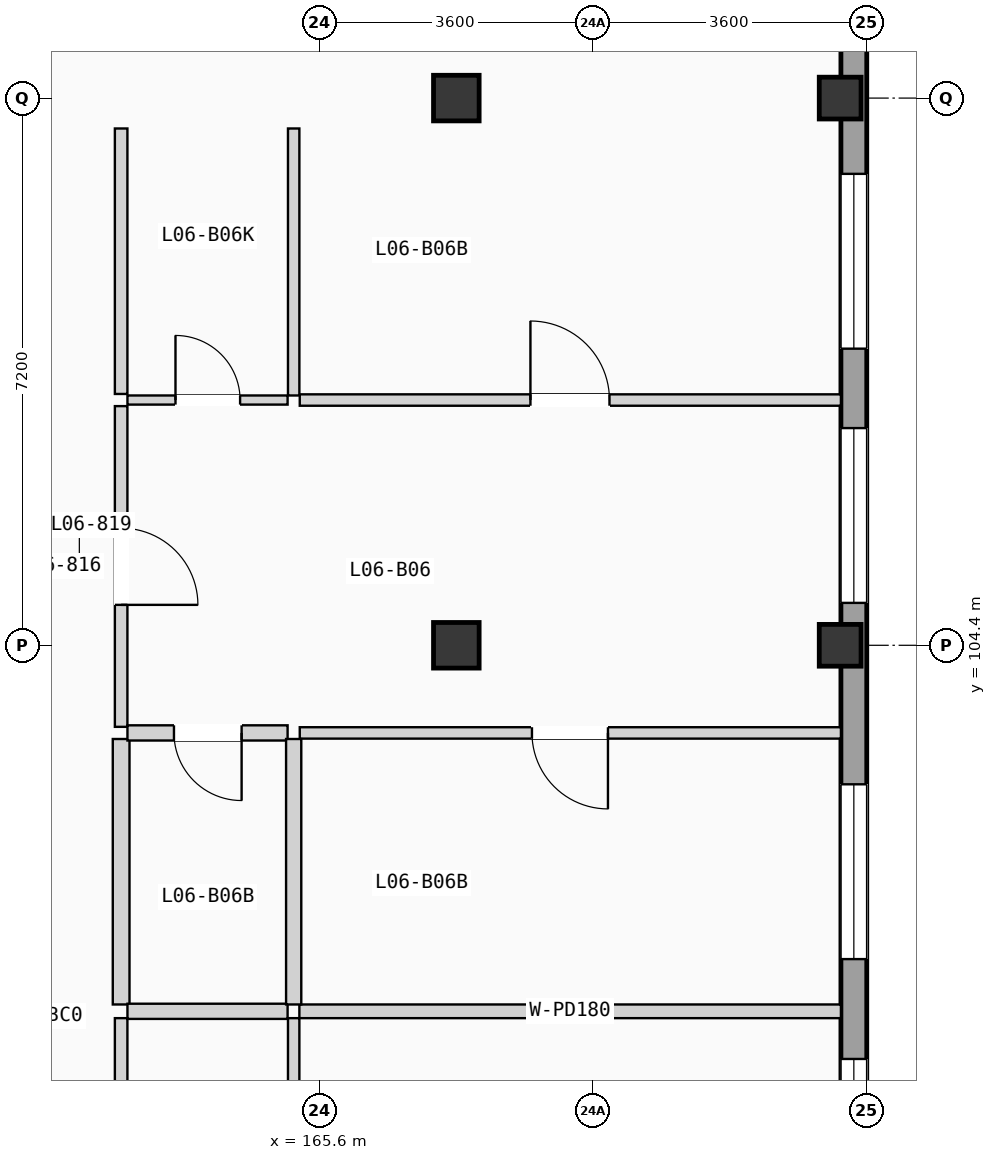
"""IFC4 building model, lengths in metres.
Left out: names, types, materials, properties, quantities, classifications, styles, units other than length and angle.
Written with IfcOpenShell. Run it as: python <this file> out.ifc"""

import sys

from ifc_helpers import new_model, si_unit, direction, frame, frame_2d, origin, origin_2d, place, context, subcontext, project, spatial, rectangle, extrude, element, fill, save


model = new_model("IFC4")
c1 = context("Model", 3, precision=1e-05, world=origin(), true_north=direction((0.0, 1.0)))
c2 = subcontext(c1, "Body", "Model", "MODEL_VIEW")
j1 = project(units=[si_unit("LENGTHUNIT", "METRE"), si_unit("PLANEANGLEUNIT", "RADIAN")], contexts=[c1])
p1 = place(None, origin())
s1 = spatial("IfcSite", under=j1, at=p1, CompositionType="ELEMENT")
p2 = place(p1, origin())
s2 = spatial("IfcBuilding", under=s1, at=p2, CompositionType="ELEMENT")
p3 = place(p2, frame((0.0, 0.0, 21.525)))
s3 = spatial("IfcBuildingStorey", under=s2, at=p3, CompositionType="ELEMENT", Elevation=21.525)
for number, where, z_axis, x_axis in (
    (1, (167.4, 104.4, 0.0), (0.0, 0.0, 1.0), (1.0, 0.0, 0.0)),
    (2, (167.4, 111.6, 0.0), (0.0, 0.0, 1.0), (1.0, 0.0, 0.0)),
):
    element("IfcColumn", number, at=place(p3, frame(where, z_axis=z_axis, x_axis=x_axis)), inside=s3, PredefinedType="COLUMN", context=c2, shape_type="SweptSolid", body=[
        extrude(rectangle(XDim=0.6, YDim=0.6, at=origin_2d()), origin(), (0.0, 0.0, 1.0), 3.15),
    ])
for number, where, z_axis, x_axis in (
    (3, (172.45, 104.4, 0.0), (0.0, 0.0, 1.0), (1.0, 0.0, 0.0)),
    (4, (172.45, 111.6, 0.0), (0.0, 0.0, 1.0), (1.0, 0.0, 0.0)),
):
    element("IfcColumn", number, at=place(p3, frame(where, z_axis=z_axis, x_axis=x_axis)), inside=s3, PredefinedType="COLUMN", context=c2, shape_type="SweptSolid", body=[
        extrude(rectangle(XDim=0.55, YDim=0.55, at=origin_2d()), origin(), (0.0, 0.0, 1.0), 3.15),
    ])
p4 = place(p3, frame((172.63, 68.74, 0.0), z_axis=(0.0, 0.0, 1.0), x_axis=(0.0, 1.0, 0.0)))
e5 = element("IfcWall", 5, at=p4, inside=s3, PredefinedType="SOLIDWALL", context=c2, shape_type="SweptSolid", body=[
    extrude(rectangle(XDim=49.72, YDim=0.34, at=frame_2d((24.86, 0.0))), origin(), (0.0, 0.0, 1.0), 2.89),
])
p5 = place(p4, frame((11.276, 0.0, 0.9)))
e6 = element("IfcOpeningElement", 6, at=p5, cuts=e5, PredefinedType="OPENING", context=c2, shape_type="SweptSolid", body=[
    extrude(rectangle(XDim=2.15, YDim=1.2, at=frame_2d((1.075, 0.6))), frame((0.0, 0.18, 0.0), z_axis=(0.0, -1.0, 0.0), x_axis=(1.0, 0.0, 0.0)), (0.0, 0.0, 1.0), 0.36),
])
p6 = place(p4, frame((7.931, 0.0, 0.855)))
e7 = element("IfcOpeningElement", 7, at=p6, cuts=e5, PredefinedType="OPENING", context=c2, shape_type="SweptSolid", body=[
    extrude(rectangle(XDim=2.15, YDim=1.35, at=frame_2d((1.075, 0.675))), frame((0.0, 0.18, 0.0), z_axis=(0.0, -1.0, 0.0), x_axis=(1.0, 0.0, 0.0)), (0.0, 0.0, 1.0), 0.36),
])
p7 = place(p4, frame((15.965, 0.0, 0.705)))
e8 = element("IfcOpeningElement", 8, at=p7, cuts=e5, PredefinedType="OPENING", context=c2, shape_type="SweptSolid", body=[
    extrude(rectangle(XDim=2.15, YDim=1.5, at=frame_2d((1.075, 0.75))), frame((0.0, 0.18, 0.0), z_axis=(0.0, -1.0, 0.0), x_axis=(1.0, 0.0, 0.0)), (0.0, 0.0, 1.0), 0.36),
])
p8 = place(p4, frame((23.785, 0.0, 0.555)))
e9 = element("IfcOpeningElement", 9, at=p8, cuts=e5, PredefinedType="OPENING", context=c2, shape_type="SweptSolid", body=[
    extrude(rectangle(XDim=2.15, YDim=1.65, at=frame_2d((1.075, 0.825))), frame((0.0, 0.18, 0.0), z_axis=(0.0, -1.0, 0.0), x_axis=(1.0, 0.0, 0.0)), (0.0, 0.0, 1.0), 0.36),
])
p9 = place(p4, frame((19.503, 0.0, 0.85)))
e10 = element("IfcOpeningElement", 10, at=p9, cuts=e5, PredefinedType="OPENING", context=c2, shape_type="SweptSolid", body=[
    extrude(rectangle(XDim=0.95, YDim=1.2, at=frame_2d((0.475, 0.6))), frame((0.0, 0.18, 0.0), z_axis=(0.0, -1.0, 0.0), x_axis=(1.0, 0.0, 0.0)), (0.0, 0.0, 1.0), 0.36),
])
p10 = place(p4, frame((29.267, 0.0, 0.85)))
e11 = element("IfcOpeningElement", 11, at=p10, cuts=e5, PredefinedType="OPENING", context=c2, shape_type="SweptSolid", body=[
    extrude(rectangle(XDim=0.95, YDim=1.2, at=frame_2d((0.475, 0.6))), frame((0.0, 0.18, 0.0), z_axis=(0.0, -1.0, 0.0), x_axis=(1.0, 0.0, 0.0)), (0.0, 0.0, 1.0), 0.36),
])
p11 = place(p4, frame((36.218, 0.0, 0.855)))
e12 = element("IfcOpeningElement", 12, at=p11, cuts=e5, PredefinedType="OPENING", context=c2, shape_type="SweptSolid", body=[
    extrude(rectangle(XDim=2.3, YDim=1.35, at=frame_2d((1.15, 0.675))), frame((0.0, 0.18, 0.0), z_axis=(0.0, -1.0, 0.0), x_axis=(1.0, 0.0, 0.0)), (0.0, 0.0, 1.0), 0.36),
])
p12 = place(p4, frame((31.531, 0.0, 0.705)))
e13 = element("IfcOpeningElement", 13, at=p12, cuts=e5, PredefinedType="OPENING", context=c2, shape_type="SweptSolid", body=[
    extrude(rectangle(XDim=2.3, YDim=1.5, at=frame_2d((1.15, 0.75))), frame((0.0, 0.18, 0.0), z_axis=(0.0, -1.0, 0.0), x_axis=(1.0, 0.0, 0.0)), (0.0, 0.0, 1.0), 0.36),
])
p13 = place(p4, frame((39.563, 0.0, 0.555)))
e14 = element("IfcOpeningElement", 14, at=p13, cuts=e5, PredefinedType="OPENING", context=c2, shape_type="SweptSolid", body=[
    extrude(rectangle(XDim=2.3, YDim=1.65, at=frame_2d((1.15, 0.825))), frame((0.0, 0.18, 0.0), z_axis=(0.0, -1.0, 0.0), x_axis=(1.0, 0.0, 0.0)), (0.0, 0.0, 1.0), 0.36),
])
p14 = place(p3, frame((162.99, 95.92, 0.0), z_axis=(0.0, 0.0, 1.0), x_axis=(0.0, 1.0, 0.0)))
e15 = element("IfcWall", 15, at=p14, inside=s3, PredefinedType="PARTITIONING", context=c2, shape_type="SweptSolid", body=[
    extrude(rectangle(XDim=3.574, YDim=0.165, at=frame_2d((1.787, 0.0))), origin(), (0.0, 0.0, 1.0), 2.87),
])
p15 = place(p3, frame((162.99, 103.327, 0.0), z_axis=(0.0, 0.0, 1.0), x_axis=(0.0, 1.0, 0.0)))
e16 = element("IfcWall", 16, at=p15, inside=s3, PredefinedType="PARTITIONING", context=c2, shape_type="SweptSolid", body=[
    extrude(rectangle(XDim=4.22, YDim=0.165, at=frame_2d((2.11, 0.0))), origin(), (0.0, 0.0, 1.0), 2.87),
])
p16 = place(p15, frame((1.605, 0.0, 0.0)))
e17 = element("IfcOpeningElement", 17, at=p16, cuts=e16, PredefinedType="OPENING", context=c2, shape_type="SweptSolid", body=[
    extrude(rectangle(XDim=1.01, YDim=2.11, at=frame_2d((0.505, 1.055))), frame((0.0, 0.093, 0.0), z_axis=(0.0, -1.0, 0.0), x_axis=(1.0, 0.0, 0.0)), (0.0, 0.0, 1.0), 0.185),
])
p17 = place(p3, frame((162.99, 99.674, 0.0), z_axis=(0.0, 0.0, 1.0), x_axis=(0.0, 1.0, 0.0)))
e18 = element("IfcWall", 18, at=p17, inside=s3, PredefinedType="PLUMBINGWALL", context=c2, shape_type="SweptSolid", body=[
    extrude(rectangle(XDim=3.493, YDim=0.22, at=frame_2d((1.747, 0.0))), origin(), (0.0, 0.0, 1.0), 2.87),
])
p18 = place(p3, frame((162.99, 107.707, 0.0), z_axis=(0.0, 0.0, 1.0), x_axis=(0.0, 1.0, 0.0)))
e19 = element("IfcWall", 19, at=p18, inside=s3, PredefinedType="PARTITIONING", context=c2, shape_type="SweptSolid", body=[
    extrude(rectangle(XDim=3.493, YDim=0.165, at=frame_2d((1.747, 0.0))), origin(), (0.0, 0.0, 1.0), 2.87),
])
p19 = place(p3, frame((165.26, 95.9, 0.0), z_axis=(0.0, 0.0, 1.0), x_axis=(0.0, 1.0, 0.0)))
e20 = element("IfcWall", 20, at=p19, inside=s3, PredefinedType="PARTITIONING", context=c2, shape_type="SweptSolid", body=[
    extrude(rectangle(XDim=3.594, YDim=0.15, at=frame_2d((1.797, 0.0))), origin(), (0.0, 0.0, 1.0), 2.87),
])
p20 = place(p3, frame((163.073, 99.584, 0.0), z_axis=(0.0, 0.0, 1.0), x_axis=(1.0, 0.0, 0.0)))
e21 = element("IfcWall", 21, at=p20, inside=s3, PredefinedType="PLUMBINGWALL", context=c2, shape_type="SweptSolid", body=[
    extrude(rectangle(XDim=2.107, YDim=0.2, at=frame_2d((1.053, 0.0))), origin(), (0.0, 0.0, 1.0), 2.87),
])
p21 = place(p3, frame((165.335, 99.584, 0.0), z_axis=(0.0, 0.0, 1.0), x_axis=(1.0, 0.0, 0.0)))
e22 = element("IfcWall", 22, at=p21, inside=s3, PredefinedType="PARTITIONING", context=c2, shape_type="SweptSolid", body=[
    extrude(rectangle(XDim=7.125, YDim=0.18, at=frame_2d((3.562, 0.0))), origin(), (0.0, 0.0, 1.0), 2.87),
])
p22 = place(p3, frame((163.073, 103.247, 0.0), z_axis=(0.0, 0.0, 1.0), x_axis=(1.0, 0.0, 0.0)))
e23 = element("IfcWall", 23, at=p22, inside=s3, PredefinedType="PLUMBINGWALL", context=c2, shape_type="SweptSolid", body=[
    extrude(rectangle(XDim=2.107, YDim=0.2, at=frame_2d((1.053, 0.0))), origin(), (0.0, 0.0, 1.0), 2.87),
])
p23 = place(p22, frame((0.612, 0.0, 0.0)))
e24 = element("IfcOpeningElement", 24, at=p23, cuts=e23, PredefinedType="OPENING", context=c2, shape_type="SweptSolid", body=[
    extrude(rectangle(XDim=0.89, YDim=2.03, at=frame_2d((0.445, 1.015))), frame((0.0, 0.11, 0.0), z_axis=(0.0, -1.0, 0.0), x_axis=(1.0, 0.0, 0.0)), (0.0, 0.0, 1.0), 0.22),
])
p24 = place(p3, frame((163.073, 107.627, 0.0), z_axis=(0.0, 0.0, 1.0), x_axis=(1.0, 0.0, 0.0)))
e25 = element("IfcWall", 25, at=p24, inside=s3, PredefinedType="PARTITIONING", context=c2, shape_type="SweptSolid", body=[
    extrude(rectangle(XDim=2.107, YDim=0.12, at=frame_2d((1.053, 0.0))), origin(), (0.0, 0.0, 1.0), 2.87),
])
p25 = place(p24, frame((0.632, 0.0, 0.0)))
e26 = element("IfcOpeningElement", 26, at=p25, cuts=e25, PredefinedType="OPENING", context=c2, shape_type="SweptSolid", body=[
    extrude(rectangle(XDim=0.85, YDim=2.01, at=frame_2d((0.425, 1.005))), frame((0.0, 0.07, 0.0), z_axis=(0.0, -1.0, 0.0), x_axis=(1.0, 0.0, 0.0)), (0.0, 0.0, 1.0), 0.14),
])
p26 = place(p3, frame((165.34, 103.247, 0.0), z_axis=(0.0, 0.0, 1.0), x_axis=(1.0, 0.0, 0.0)))
e27 = element("IfcWall", 27, at=p26, inside=s3, PredefinedType="PARTITIONING", context=c2, shape_type="SweptSolid", body=[
    extrude(rectangle(XDim=7.12, YDim=0.15, at=frame_2d((3.56, 0.0))), origin(), (0.0, 0.0, 1.0), 2.87),
])
p27 = place(p26, frame((3.055, 0.0, 0.0)))
e28 = element("IfcOpeningElement", 28, at=p27, cuts=e27, PredefinedType="OPENING", context=c2, shape_type="SweptSolid", body=[
    extrude(rectangle(XDim=1.0, YDim=2.06, at=frame_2d((0.5, 1.03))), frame((0.0, 0.085, 0.0), z_axis=(0.0, -1.0, 0.0), x_axis=(1.0, 0.0, 0.0)), (0.0, 0.0, 1.0), 0.17),
])
p28 = place(p3, frame((165.34, 107.627, 0.0), z_axis=(0.0, 0.0, 1.0), x_axis=(1.0, 0.0, 0.0)))
e29 = element("IfcWall", 29, at=p28, inside=s3, PredefinedType="PARTITIONING", context=c2, shape_type="SweptSolid", body=[
    extrude(rectangle(XDim=7.12, YDim=0.15, at=frame_2d((3.56, 0.0))), origin(), (0.0, 0.0, 1.0), 2.87),
])
p29 = place(p28, frame((3.035, 0.0, 0.0)))
e30 = element("IfcOpeningElement", 30, at=p29, cuts=e29, PredefinedType="OPENING", context=c2, shape_type="SweptSolid", body=[
    extrude(rectangle(XDim=1.04, YDim=2.08, at=frame_2d((0.52, 1.04))), frame((0.0, 0.085, 0.0), z_axis=(0.0, -1.0, 0.0), x_axis=(1.0, 0.0, 0.0)), (0.0, 0.0, 1.0), 0.17),
])
p30 = place(p3, frame((165.26, 99.674, 0.0), z_axis=(0.0, 0.0, 1.0), x_axis=(0.0, 1.0, 0.0)))
e31 = element("IfcWall", 31, at=p30, inside=s3, PredefinedType="PLUMBINGWALL", context=c2, shape_type="SweptSolid", body=[
    extrude(rectangle(XDim=3.493, YDim=0.2, at=frame_2d((1.747, 0.0))), origin(), (0.0, 0.0, 1.0), 2.87),
])
p31 = place(p3, frame((165.26, 107.687, 0.0), z_axis=(0.0, 0.0, 1.0), x_axis=(0.0, 1.0, 0.0)))
e32 = element("IfcWall", 32, at=p31, inside=s3, PredefinedType="PARTITIONING", context=c2, shape_type="SweptSolid", body=[
    extrude(rectangle(XDim=3.513, YDim=0.15, at=frame_2d((1.756, 0.0))), origin(), (0.0, 0.0, 1.0), 2.87),
])
p32 = place(p10, origin())
e33 = element("IfcWindow", 33, at=p32, inside=s3, PartitioningType="SINGLE_PANEL", PredefinedType="WINDOW", context=c2, shape_type="SweptSolid", body=[
    extrude(rectangle(XDim=0.95, YDim=1.2, at=frame_2d((0.475, 0.6))), frame((0.0, 0.03, 0.0), z_axis=(0.0, -1.0, 0.0), x_axis=(1.0, 0.0, 0.0)), (0.0, 0.0, 1.0), 0.06),
])
fill(e11, e33)
p33 = place(p11, origin())
e34 = element("IfcWindow", 34, at=p33, inside=s3, PartitioningType="DOUBLE_PANEL_VERTICAL", PredefinedType="WINDOW", context=c2, shape_type="SweptSolid", body=[
    extrude(rectangle(XDim=2.3, YDim=1.35, at=frame_2d((1.15, 0.675))), frame((0.0, 0.03, 0.0), z_axis=(0.0, -1.0, 0.0), x_axis=(1.0, 0.0, 0.0)), (0.0, 0.0, 1.0), 0.06),
])
fill(e12, e34)
p34 = place(p12, origin())
e35 = element("IfcWindow", 35, at=p34, inside=s3, PartitioningType="DOUBLE_PANEL_VERTICAL", PredefinedType="WINDOW", context=c2, shape_type="SweptSolid", body=[
    extrude(rectangle(XDim=2.3, YDim=1.5, at=frame_2d((1.15, 0.75))), frame((0.0, 0.03, 0.0), z_axis=(0.0, -1.0, 0.0), x_axis=(1.0, 0.0, 0.0)), (0.0, 0.0, 1.0), 0.06),
])
fill(e13, e35)
p35 = place(p13, origin())
e36 = element("IfcWindow", 36, at=p35, inside=s3, PartitioningType="DOUBLE_PANEL_VERTICAL", PredefinedType="WINDOW", context=c2, shape_type="SweptSolid", body=[
    extrude(rectangle(XDim=2.3, YDim=1.65, at=frame_2d((1.15, 0.825))), frame((0.0, 0.03, 0.0), z_axis=(0.0, -1.0, 0.0), x_axis=(1.0, 0.0, 0.0)), (0.0, 0.0, 1.0), 0.06),
])
fill(e14, e36)
p36 = place(p16, frame((1.01, 0.0, 0.0), z_axis=(0.0, 0.0, 1.0), x_axis=(-1.0, 0.0, 0.0)))
e37 = element("IfcDoor", 37, at=p36, inside=s3, OperationType="SINGLE_SWING_LEFT", PredefinedType="DOOR", context=c2, shape_type="SweptSolid", body=[
    extrude(rectangle(XDim=1.01, YDim=2.11, at=frame_2d((0.505, 1.055))), frame((0.0, 0.025, 0.0), z_axis=(0.0, -1.0, 0.0), x_axis=(1.0, 0.0, 0.0)), (0.0, 0.0, 1.0), 0.05),
])
fill(e17, e37)
p37 = place(p23, frame((0.89, 0.0, 0.0), z_axis=(0.0, 0.0, 1.0), x_axis=(-1.0, 0.0, 0.0)))
e38 = element("IfcDoor", 38, at=p37, inside=s3, OperationType="SINGLE_SWING_RIGHT", PredefinedType="DOOR", context=c2, shape_type="SweptSolid", body=[
    extrude(rectangle(XDim=0.89, YDim=2.03, at=frame_2d((0.445, 1.015))), frame((0.0, 0.025, 0.0), z_axis=(0.0, -1.0, 0.0), x_axis=(1.0, 0.0, 0.0)), (0.0, 0.0, 1.0), 0.05),
])
fill(e24, e38)
p38 = place(p25, origin())
e39 = element("IfcDoor", 39, at=p38, inside=s3, OperationType="SINGLE_SWING_LEFT", PredefinedType="DOOR", context=c2, shape_type="SweptSolid", body=[
    extrude(rectangle(XDim=0.85, YDim=2.01, at=frame_2d((0.425, 1.005))), frame((0.0, 0.025, 0.0), z_axis=(0.0, -1.0, 0.0), x_axis=(1.0, 0.0, 0.0)), (0.0, 0.0, 1.0), 0.05),
])
fill(e26, e39)
p39 = place(p27, frame((1.0, 0.0, 0.0), z_axis=(0.0, 0.0, 1.0), x_axis=(-1.0, 0.0, 0.0)))
e40 = element("IfcDoor", 40, at=p39, inside=s3, OperationType="SINGLE_SWING_RIGHT", PredefinedType="DOOR", context=c2, shape_type="SweptSolid", body=[
    extrude(rectangle(XDim=1.0, YDim=2.06, at=frame_2d((0.5, 1.03))), frame((0.0, 0.025, 0.0), z_axis=(0.0, -1.0, 0.0), x_axis=(1.0, 0.0, 0.0)), (0.0, 0.0, 1.0), 0.05),
])
fill(e28, e40)
p40 = place(p29, origin())
e41 = element("IfcDoor", 41, at=p40, inside=s3, OperationType="SINGLE_SWING_LEFT", PredefinedType="DOOR", context=c2, shape_type="SweptSolid", body=[
    extrude(rectangle(XDim=1.04, YDim=2.08, at=frame_2d((0.52, 1.04))), frame((0.0, 0.025, 0.0), z_axis=(0.0, -1.0, 0.0), x_axis=(1.0, 0.0, 0.0)), (0.0, 0.0, 1.0), 0.05),
])
fill(e30, e41)
save(model, sys.argv[1])
